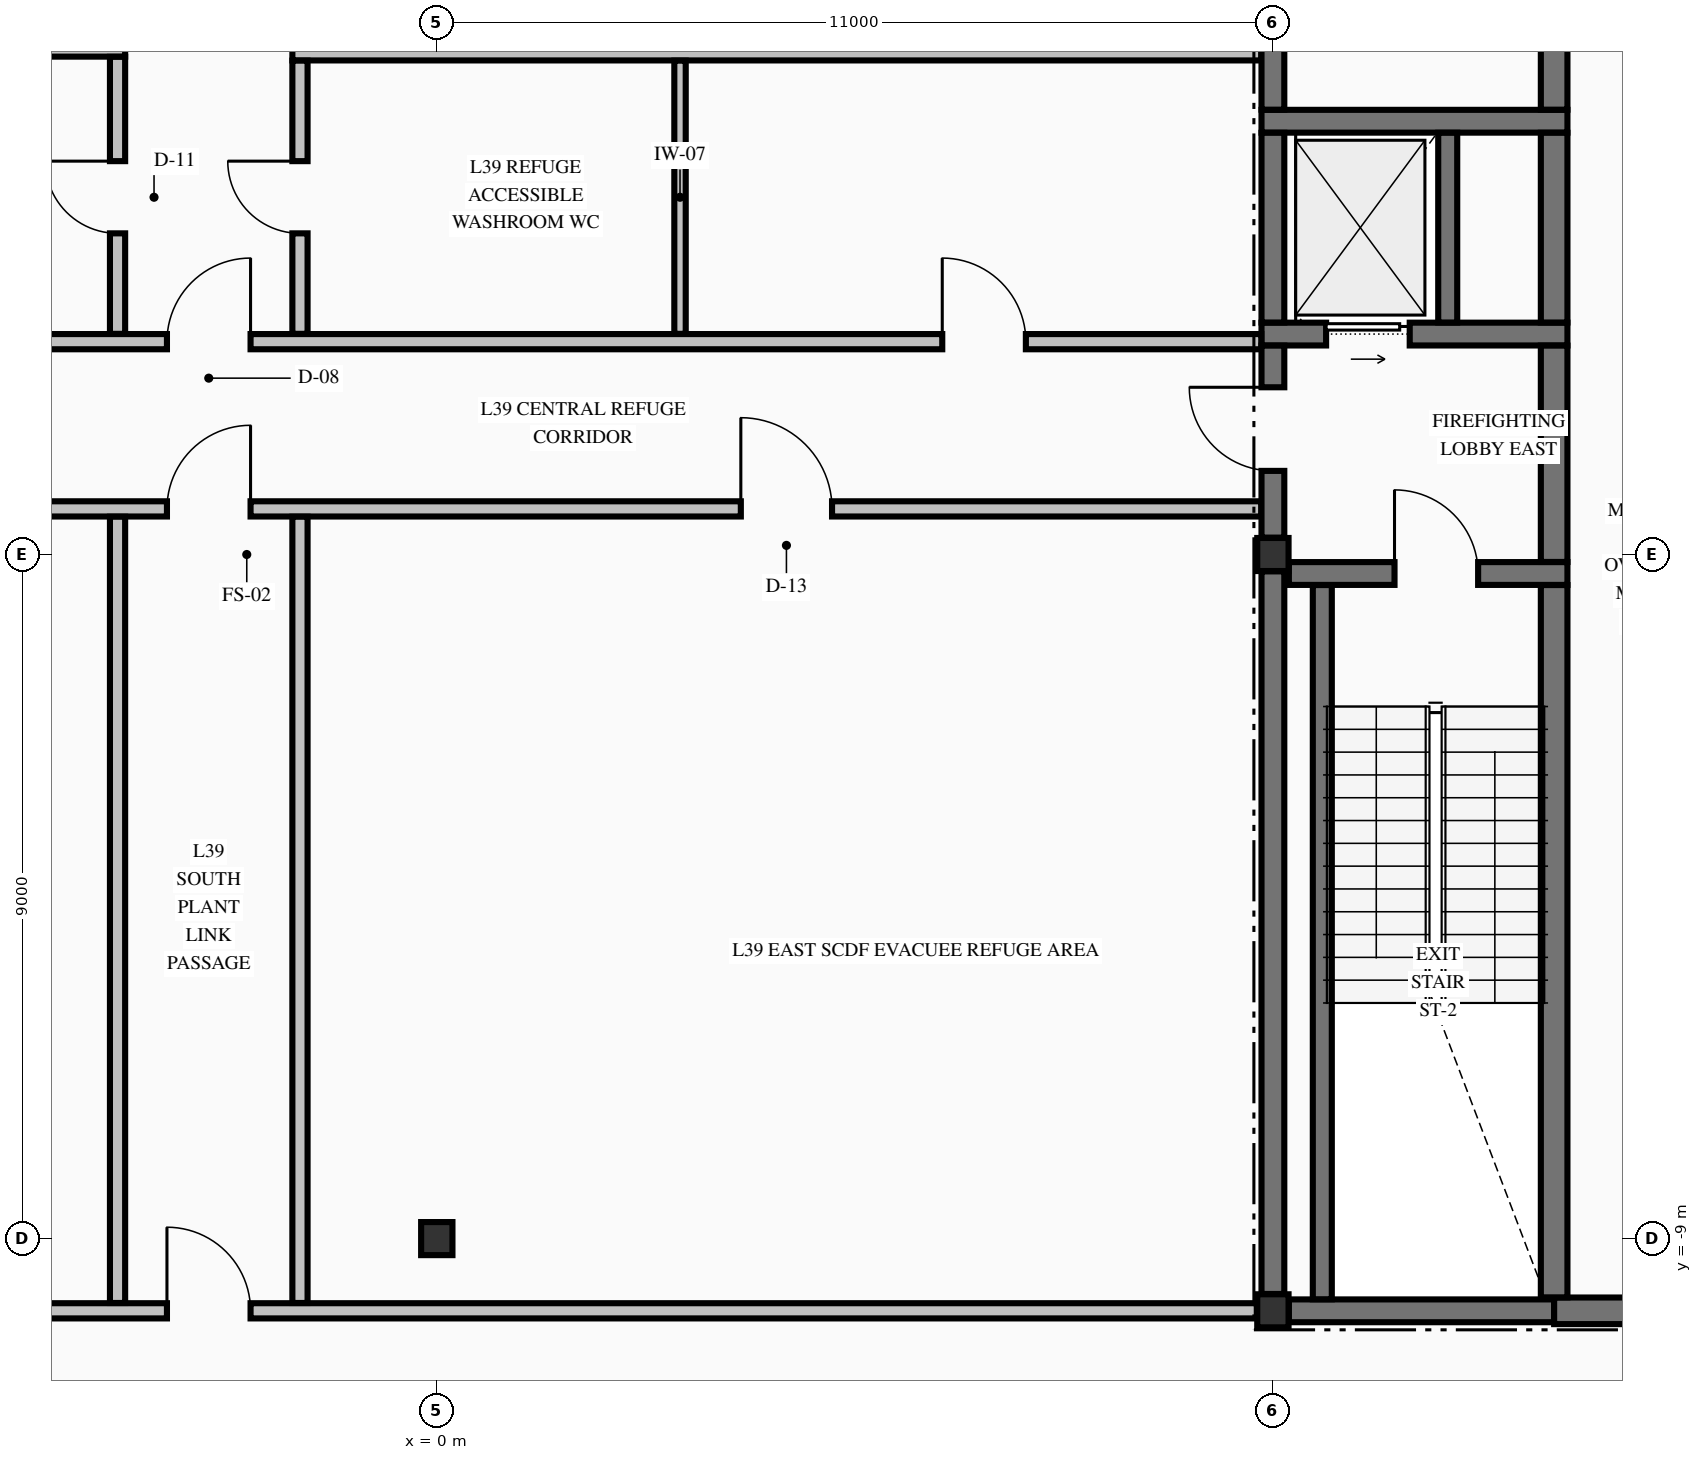
"""IFC4 building model, lengths in metres.
Left out: names, types, materials, properties, quantities, classifications, styles, units other than length and angle.
Written with IfcOpenShell. Run it as: python <this file> out.ifc"""

import sys

from ifc_helpers import new_model, si_unit, direction, frame, frame_2d, origin, origin_2d, place, context, subcontext, project, spatial, rectangle, i_section, extrude, element, fill, save


model = new_model("IFC4")
c1 = context("Model", 3, precision=1e-05, world=origin(), true_north=direction((0.0, 1.0)))
c2 = subcontext(c1, "Body", "Model", "MODEL_VIEW")
j1 = project(units=[si_unit("LENGTHUNIT", "METRE"), si_unit("PLANEANGLEUNIT", "RADIAN")], contexts=[c1])
p1 = place(None, origin())
s1 = spatial("IfcSite", under=j1, at=p1, CompositionType="ELEMENT")
p2 = place(p1, origin())
s2 = spatial("IfcBuilding", under=s1, at=p2, CompositionType="ELEMENT")
p3 = place(p2, frame((0.0, 0.0, 153.48)))
s3 = spatial("IfcBuildingStorey", under=s2, at=p3, CompositionType="ELEMENT", Elevation=153.48)
for number, where, z_axis, x_axis in (
    (1, (11.0, -9.95, -0.425), (0.0, 0.0, 1.0), (1.0, 0.0, 0.0)),
    (2, (11.0, 0.0, -0.425), (0.0, 0.0, 1.0), (1.0, 0.0, 0.0)),
    (3, (0.0, -9.0, -0.425), (0.0, 0.0, 1.0), (1.0, 0.0, 0.0)),
):
    element("IfcColumn", number, at=place(p3, frame(where, z_axis=z_axis, x_axis=x_axis)), inside=s3, PredefinedType="COLUMN", context=c2, shape_type="SweptSolid", body=[
        extrude(i_section(OverallWidth=0.412, OverallDepth=0.435, WebThickness=0.036, FlangeThickness=0.058, FilletRadius=0.015, at=origin_2d()), origin(), (0.0, 0.0, 1.0), 4.76),
    ])
p4 = place(p3, frame((11.21, -9.95, 0.0), z_axis=(0.0, 0.0, 1.0), x_axis=(1.0, 0.0, 0.0)))
e4 = element("IfcWall", 4, at=p4, inside=s3, PredefinedType="SHEAR", context=c2, shape_type="SweptSolid", body=[
    extrude(rectangle(XDim=3.49, YDim=0.3, at=frame_2d((1.745, 0.0))), origin(), (0.0, 0.0, 1.0), 4.335),
])
p5 = place(p3, frame((14.7, -9.95, 0.0), z_axis=(0.0, 0.0, 1.0), x_axis=(1.0, 0.0, 0.0)))
e5 = element("IfcWall", 5, at=p5, inside=s3, PredefinedType="SHEAR", context=c2, shape_type="SweptSolid", body=[
    extrude(rectangle(XDim=5.09, YDim=0.35, at=frame_2d((2.545, 0.0))), origin(), (0.0, 0.0, 1.0), 4.335),
])
p6 = place(p5, frame((3.25, 0.0, 0.0)))
e6 = element("IfcOpeningElement", 6, at=p6, cuts=e5, PredefinedType="OPENING", context=c2, shape_type="SweptSolid", body=[
    extrude(rectangle(XDim=0.9, YDim=2.15, at=frame_2d((0.45, 1.075))), frame((0.0, 0.185, 0.0), z_axis=(0.0, -1.0, 0.0), x_axis=(1.0, 0.0, 0.0)), (0.0, 0.0, 1.0), 0.37),
])
p7 = place(p3, frame((11.21, -0.25, 0.0), z_axis=(0.0, 0.0, 1.0), x_axis=(1.0, 0.0, 0.0)))
e7 = element("IfcWall", 7, at=p7, inside=s3, PredefinedType="SHEAR", context=c2, shape_type="SweptSolid", body=[
    extrude(rectangle(XDim=3.665, YDim=0.3, at=frame_2d((1.833, 0.0))), origin(), (0.0, 0.0, 1.0), 4.335),
])
p8 = place(p7, frame((1.39, 0.0, 0.0)))
e8 = element("IfcOpeningElement", 8, at=p8, cuts=e7, PredefinedType="OPENING", context=c2, shape_type="SweptSolid", body=[
    extrude(rectangle(XDim=1.1, YDim=2.15, at=frame_2d((0.55, 1.075))), frame((0.0, 0.16, 0.0), z_axis=(0.0, -1.0, 0.0), x_axis=(1.0, 0.0, 0.0)), (0.0, 0.0, 1.0), 0.32),
])
p9 = place(p3, frame((10.85, 2.9, 0.0), z_axis=(0.0, 0.0, 1.0), x_axis=(1.0, 0.0, 0.0)))
e9 = element("IfcWall", 9, at=p9, inside=s3, PredefinedType="SHEAR", context=c2, shape_type="SweptSolid", body=[
    extrude(rectangle(XDim=4.025, YDim=0.3, at=frame_2d((2.012, 0.0))), origin(), (0.0, 0.0, 1.0), 4.335),
])
p10 = place(p9, frame((0.85, 0.0, 0.0)))
e10 = element("IfcOpeningElement", 10, at=p10, cuts=e9, PredefinedType="OPENING", context=c2, shape_type="SweptSolid", body=[
    extrude(rectangle(XDim=1.1, YDim=2.2, at=frame_2d((0.55, 1.1))), frame((0.0, 0.16, 0.0), z_axis=(0.0, -1.0, 0.0), x_axis=(1.0, 0.0, 0.0)), (0.0, 0.0, 1.0), 0.32),
])
p11 = place(p3, frame((10.85, 5.7, 0.0), z_axis=(0.0, 0.0, 1.0), x_axis=(1.0, 0.0, 0.0)))
e11 = element("IfcWall", 11, at=p11, inside=s3, PredefinedType="SHEAR", context=c2, shape_type="SweptSolid", body=[
    extrude(rectangle(XDim=4.025, YDim=0.3, at=frame_2d((2.012, 0.0))), origin(), (0.0, 0.0, 1.0), 4.335),
])
p12 = place(p3, frame((-10.788, -9.95, 0.0), z_axis=(0.0, 0.0, 1.0), x_axis=(1.0, 0.0, 0.0)))
e12 = element("IfcWall", 12, at=p12, inside=s3, PredefinedType="PARTITIONING", context=c2, shape_type="SweptSolid", body=[
    extrude(rectangle(XDim=21.576, YDim=0.2, at=frame_2d((10.788, 0.0))), origin(), (0.0, 0.0, 1.0), 4.335),
])
p13 = place(p12, frame((7.238, 0.0, 0.0)))
e13 = element("IfcOpeningElement", 13, at=p13, cuts=e12, PredefinedType="OPENING", context=c2, shape_type="SweptSolid", body=[
    extrude(rectangle(XDim=1.1, YDim=2.15, at=frame_2d((0.55, 1.075))), frame((0.0, 0.11, 0.0), z_axis=(0.0, -1.0, 0.0), x_axis=(1.0, 0.0, 0.0)), (0.0, 0.0, 1.0), 0.22),
])
p14 = place(p3, frame((-10.847, 0.6, 0.0), z_axis=(0.0, 0.0, 1.0), x_axis=(1.0, 0.0, 0.0)))
e14 = element("IfcWall", 14, at=p14, inside=s3, PredefinedType="PARTITIONING", context=c2, shape_type="SweptSolid", body=[
    extrude(rectangle(XDim=21.694, YDim=0.2, at=frame_2d((10.847, 0.0))), origin(), (0.0, 0.0, 1.0), 4.335),
])
p15 = place(p14, frame((7.297, 0.0, 0.0)))
e15 = element("IfcOpeningElement", 15, at=p15, cuts=e14, PredefinedType="OPENING", context=c2, shape_type="SweptSolid", body=[
    extrude(rectangle(XDim=1.1, YDim=2.15, at=frame_2d((0.55, 1.075))), frame((0.0, 0.11, 0.0), z_axis=(0.0, -1.0, 0.0), x_axis=(1.0, 0.0, 0.0)), (0.0, 0.0, 1.0), 0.22),
])
p16 = place(p14, frame((2.647, 0.0, 0.0)))
e16 = element("IfcOpeningElement", 16, at=p16, cuts=e14, PredefinedType="OPENING", context=c2, shape_type="SweptSolid", body=[
    extrude(rectangle(XDim=1.2, YDim=2.15, at=frame_2d((0.6, 1.075))), frame((0.0, 0.11, 0.0), z_axis=(0.0, -1.0, 0.0), x_axis=(1.0, 0.0, 0.0)), (0.0, 0.0, 1.0), 0.22),
])
p17 = place(p14, frame((14.847, 0.0, 0.0)))
e17 = element("IfcOpeningElement", 17, at=p17, cuts=e14, PredefinedType="OPENING", context=c2, shape_type="SweptSolid", body=[
    extrude(rectangle(XDim=1.2, YDim=2.15, at=frame_2d((0.6, 1.075))), frame((0.0, 0.11, 0.0), z_axis=(0.0, -1.0, 0.0), x_axis=(1.0, 0.0, 0.0)), (0.0, 0.0, 1.0), 0.22),
])
p18 = place(p3, frame((-10.847, 2.8, 0.0), z_axis=(0.0, 0.0, 1.0), x_axis=(1.0, 0.0, 0.0)))
e18 = element("IfcWall", 18, at=p18, inside=s3, PredefinedType="PARTITIONING", context=c2, shape_type="SweptSolid", body=[
    extrude(rectangle(XDim=21.694, YDim=0.2, at=frame_2d((10.847, 0.0))), origin(), (0.0, 0.0, 1.0), 4.335),
])
p19 = place(p18, frame((7.297, 0.0, 0.0)))
e19 = element("IfcOpeningElement", 19, at=p19, cuts=e18, PredefinedType="OPENING", context=c2, shape_type="SweptSolid", body=[
    extrude(rectangle(XDim=1.1, YDim=2.15, at=frame_2d((0.55, 1.075))), frame((0.0, 0.11, 0.0), z_axis=(0.0, -1.0, 0.0), x_axis=(1.0, 0.0, 0.0)), (0.0, 0.0, 1.0), 0.22),
])
p20 = place(p18, frame((17.497, 0.0, 0.0)))
e20 = element("IfcOpeningElement", 20, at=p20, cuts=e18, PredefinedType="OPENING", context=c2, shape_type="SweptSolid", body=[
    extrude(rectangle(XDim=1.1, YDim=2.15, at=frame_2d((0.55, 1.075))), frame((0.0, 0.11, 0.0), z_axis=(0.0, -1.0, 0.0), x_axis=(1.0, 0.0, 0.0)), (0.0, 0.0, 1.0), 0.22),
])
p21 = place(p3, frame((-1.9, 6.6, 0.0), z_axis=(0.0, 0.0, 1.0), x_axis=(1.0, 0.0, 0.0)))
e21 = element("IfcWall", 21, at=p21, inside=s3, PredefinedType="PARTITIONING", context=c2, shape_type="SweptSolid", body=[
    extrude(rectangle(XDim=12.747, YDim=0.2, at=frame_2d((6.374, 0.0))), origin(), (0.0, 0.0, 1.0), 4.335),
])
p22 = place(p3, frame((-10.847, 6.65, 0.0), z_axis=(0.0, 0.0, 1.0), x_axis=(1.0, 0.0, 0.0)))
e22 = element("IfcWall", 22, at=p22, inside=s3, PredefinedType="PARTITIONING", context=c2, shape_type="SweptSolid", body=[
    extrude(rectangle(XDim=6.747, YDim=0.2, at=frame_2d((3.374, 0.0))), origin(), (0.0, 0.0, 1.0), 4.335),
])
p23 = place(p3, frame((11.0, -9.729, 0.0), z_axis=(0.0, 0.0, 1.0), x_axis=(0.0, 1.0, 0.0)))
e23 = element("IfcWall", 23, at=p23, inside=s3, PredefinedType="SHEAR", context=c2, shape_type="SweptSolid", body=[
    extrude(rectangle(XDim=9.507, YDim=0.3, at=frame_2d((4.753, 0.0))), origin(), (0.0, 0.0, 1.0), 4.335),
])
p24 = place(p3, frame((11.0, 0.221, 0.0), z_axis=(0.0, 0.0, 1.0), x_axis=(0.0, 1.0, 0.0)))
e24 = element("IfcWall", 24, at=p24, inside=s3, PredefinedType="SHEAR", context=c2, shape_type="SweptSolid", body=[
    extrude(rectangle(XDim=2.527, YDim=0.3, at=frame_2d((1.263, 0.0))), origin(), (0.0, 0.0, 1.0), 4.335),
])
p25 = place(p24, frame((0.878, 0.0, 0.0)))
e25 = element("IfcOpeningElement", 25, at=p25, cuts=e24, PredefinedType="OPENING", context=c2, shape_type="SweptSolid", body=[
    extrude(rectangle(XDim=1.1, YDim=2.15, at=frame_2d((0.55, 1.075))), frame((0.0, 0.16, 0.0), z_axis=(0.0, -1.0, 0.0), x_axis=(1.0, 0.0, 0.0)), (0.0, 0.0, 1.0), 0.32),
])
p26 = place(p3, frame((11.0, 3.052, 0.0), z_axis=(0.0, 0.0, 1.0), x_axis=(0.0, 1.0, 0.0)))
e26 = element("IfcWall", 26, at=p26, inside=s3, PredefinedType="SHEAR", context=c2, shape_type="SweptSolid", body=[
    extrude(rectangle(XDim=2.496, YDim=0.3, at=frame_2d((1.248, 0.0))), origin(), (0.0, 0.0, 1.0), 4.335),
])
p27 = place(p3, frame((11.0, 5.852, 0.0), z_axis=(0.0, 0.0, 1.0), x_axis=(0.0, 1.0, 0.0)))
e27 = element("IfcWall", 27, at=p27, inside=s3, PredefinedType="SHEAR", context=c2, shape_type="SweptSolid", body=[
    extrude(rectangle(XDim=4.427, YDim=0.3, at=frame_2d((2.213, 0.0))), origin(), (0.0, 0.0, 1.0), 4.335),
])
p28 = place(p3, frame((11.65, -9.798, 0.0), z_axis=(0.0, 0.0, 1.0), x_axis=(0.0, 1.0, 0.0)))
e28 = element("IfcWall", 28, at=p28, inside=s3, PredefinedType="SOLIDWALL", context=c2, shape_type="SweptSolid", body=[
    extrude(rectangle(XDim=9.396, YDim=0.25, at=frame_2d((4.698, 0.0))), origin(), (0.0, 0.0, 1.0), 4.335),
])
p29 = place(p3, frame((13.3, 3.052, 0.0), z_axis=(0.0, 0.0, 1.0), x_axis=(0.0, 1.0, 0.0)))
e29 = element("IfcWall", 29, at=p29, inside=s3, PredefinedType="SOLIDWALL", context=c2, shape_type="SweptSolid", body=[
    extrude(rectangle(XDim=2.496, YDim=0.25, at=frame_2d((1.248, 0.0))), origin(), (0.0, 0.0, 1.0), 4.335),
])
p30 = place(p3, frame((14.7, -9.773, 0.0), z_axis=(0.0, 0.0, 1.0), x_axis=(0.0, 1.0, 0.0)))
e30 = element("IfcWall", 30, at=p30, inside=s3, PredefinedType="SHEAR", context=c2, shape_type="SweptSolid", body=[
    extrude(rectangle(XDim=9.371, YDim=0.35, at=frame_2d((4.686, 0.0))), origin(), (0.0, 0.0, 1.0), 4.335),
])
p31 = place(p3, frame((14.7, -0.098, 0.0), z_axis=(0.0, 0.0, 1.0), x_axis=(0.0, 1.0, 0.0)))
e31 = element("IfcWall", 31, at=p31, inside=s3, PredefinedType="SHEAR", context=c2, shape_type="SweptSolid", body=[
    extrude(rectangle(XDim=2.846, YDim=0.35, at=frame_2d((1.423, 0.0))), origin(), (0.0, 0.0, 1.0), 4.335),
])
p32 = place(p3, frame((14.7, 3.052, 0.0), z_axis=(0.0, 0.0, 1.0), x_axis=(0.0, 1.0, 0.0)))
e32 = element("IfcWall", 32, at=p32, inside=s3, PredefinedType="SHEAR", context=c2, shape_type="SweptSolid", body=[
    extrude(rectangle(XDim=2.496, YDim=0.35, at=frame_2d((1.248, 0.0))), origin(), (0.0, 0.0, 1.0), 4.335),
])
p33 = place(p3, frame((14.7, 5.852, 0.0), z_axis=(0.0, 0.0, 1.0), x_axis=(0.0, 1.0, 0.0)))
e33 = element("IfcWall", 33, at=p33, inside=s3, PredefinedType="SHEAR", context=c2, shape_type="SweptSolid", body=[
    extrude(rectangle(XDim=4.471, YDim=0.35, at=frame_2d((2.235, 0.0))), origin(), (0.0, 0.0, 1.0), 4.335),
])
p34 = place(p3, frame((-4.2, -9.847, 0.0), z_axis=(0.0, 0.0, 1.0), x_axis=(0.0, 1.0, 0.0)))
e34 = element("IfcWall", 34, at=p34, inside=s3, PredefinedType="PARTITIONING", context=c2, shape_type="SweptSolid", body=[
    extrude(rectangle(XDim=10.344, YDim=0.2, at=frame_2d((5.172, 0.0))), origin(), (0.0, 0.0, 1.0), 4.335),
])
p35 = place(p3, frame((-4.2, 2.903, 0.0), z_axis=(0.0, 0.0, 1.0), x_axis=(0.0, 1.0, 0.0)))
e35 = element("IfcWall", 35, at=p35, inside=s3, PredefinedType="PARTITIONING", context=c2, shape_type="SweptSolid", body=[
    extrude(rectangle(XDim=3.644, YDim=0.2, at=frame_2d((1.822, 0.0))), origin(), (0.0, 0.0, 1.0), 4.335),
])
p36 = place(p35, frame((1.322, 0.0, 0.0)))
e36 = element("IfcOpeningElement", 36, at=p36, cuts=e35, PredefinedType="OPENING", context=c2, shape_type="SweptSolid", body=[
    extrude(rectangle(XDim=0.95, YDim=2.15, at=frame_2d((0.475, 1.075))), frame((0.0, 0.11, 0.0), z_axis=(0.0, -1.0, 0.0), x_axis=(1.0, 0.0, 0.0)), (0.0, 0.0, 1.0), 0.22),
])
p37 = place(p3, frame((-1.8, -9.847, 0.0), z_axis=(0.0, 0.0, 1.0), x_axis=(0.0, 1.0, 0.0)))
e37 = element("IfcWall", 37, at=p37, inside=s3, PredefinedType="PARTITIONING", context=c2, shape_type="SweptSolid", body=[
    extrude(rectangle(XDim=10.344, YDim=0.2, at=frame_2d((5.172, 0.0))), origin(), (0.0, 0.0, 1.0), 4.335),
])
p38 = place(p3, frame((-1.8, 2.903, 0.0), z_axis=(0.0, 0.0, 1.0), x_axis=(0.0, 1.0, 0.0)))
e38 = element("IfcWall", 38, at=p38, inside=s3, PredefinedType="PARTITIONING", context=c2, shape_type="SweptSolid", body=[
    extrude(rectangle(XDim=3.594, YDim=0.2, at=frame_2d((1.797, 0.0))), origin(), (0.0, 0.0, 1.0), 4.335),
])
p39 = place(p38, frame((1.322, 0.0, 0.0)))
e39 = element("IfcOpeningElement", 39, at=p39, cuts=e38, PredefinedType="OPENING", context=c2, shape_type="SweptSolid", body=[
    extrude(rectangle(XDim=0.95, YDim=2.15, at=frame_2d((0.475, 1.075))), frame((0.0, 0.11, 0.0), z_axis=(0.0, -1.0, 0.0), x_axis=(1.0, 0.0, 0.0)), (0.0, 0.0, 1.0), 0.22),
])
p40 = place(p3, frame((3.2, 2.903, 0.0), z_axis=(0.0, 0.0, 1.0), x_axis=(0.0, 1.0, 0.0)))
e40 = element("IfcWall", 40, at=p40, inside=s3, PredefinedType="PARTITIONING", context=c2, shape_type="SweptSolid", body=[
    extrude(rectangle(XDim=3.594, YDim=0.15, at=frame_2d((1.797, 0.0))), origin(), (0.0, 0.0, 1.0), 4.335),
])
p41 = place(p8, origin())
e41 = element("IfcDoor", 41, at=p41, inside=s3, OperationType="SINGLE_SWING_LEFT", PredefinedType="DOOR", context=c2, shape_type="SweptSolid", body=[
    extrude(rectangle(XDim=1.1, YDim=2.15, at=frame_2d((0.55, 1.075))), frame((0.0, 0.025, 0.0), z_axis=(0.0, -1.0, 0.0), x_axis=(1.0, 0.0, 0.0)), (0.0, 0.0, 1.0), 0.05),
])
fill(e8, e41)
p42 = place(p25, origin())
e42 = element("IfcDoor", 42, at=p42, inside=s3, OperationType="SINGLE_SWING_RIGHT", PredefinedType="DOOR", context=c2, shape_type="SweptSolid", body=[
    extrude(rectangle(XDim=1.1, YDim=2.15, at=frame_2d((0.55, 1.075))), frame((0.0, 0.025, 0.0), z_axis=(0.0, -1.0, 0.0), x_axis=(1.0, 0.0, 0.0)), (0.0, 0.0, 1.0), 0.05),
])
fill(e25, e42)
p43 = place(p10, origin())
e43 = element("IfcDoor", 43, at=p43, inside=s3, OperationType="SLIDING_TO_RIGHT", PredefinedType="DOOR", context=c2, shape_type="SweptSolid", body=[
    extrude(rectangle(XDim=1.1, YDim=2.2, at=frame_2d((0.55, 1.1))), frame((0.0, 0.025, 0.0), z_axis=(0.0, -1.0, 0.0), x_axis=(1.0, 0.0, 0.0)), (0.0, 0.0, 1.0), 0.05),
])
fill(e10, e43)
p44 = place(p19, origin())
e44 = element("IfcDoor", 44, at=p44, inside=s3, OperationType="SINGLE_SWING_RIGHT", PredefinedType="DOOR", context=c2, shape_type="SweptSolid", body=[
    extrude(rectangle(XDim=1.1, YDim=2.15, at=frame_2d((0.55, 1.075))), frame((0.0, 0.025, 0.0), z_axis=(0.0, -1.0, 0.0), x_axis=(1.0, 0.0, 0.0)), (0.0, 0.0, 1.0), 0.05),
])
fill(e19, e44)
p45 = place(p15, origin())
e45 = element("IfcDoor", 45, at=p45, inside=s3, OperationType="SINGLE_SWING_RIGHT", PredefinedType="DOOR", context=c2, shape_type="SweptSolid", body=[
    extrude(rectangle(XDim=1.1, YDim=2.15, at=frame_2d((0.55, 1.075))), frame((0.0, 0.025, 0.0), z_axis=(0.0, -1.0, 0.0), x_axis=(1.0, 0.0, 0.0)), (0.0, 0.0, 1.0), 0.05),
])
fill(e15, e45)
p46 = place(p13, origin())
e46 = element("IfcDoor", 46, at=p46, inside=s3, OperationType="SINGLE_SWING_LEFT", PredefinedType="DOOR", context=c2, shape_type="SweptSolid", body=[
    extrude(rectangle(XDim=1.1, YDim=2.15, at=frame_2d((0.55, 1.075))), frame((0.0, 0.025, 0.0), z_axis=(0.0, -1.0, 0.0), x_axis=(1.0, 0.0, 0.0)), (0.0, 0.0, 1.0), 0.05),
])
fill(e13, e46)
p47 = place(p17, origin())
e47 = element("IfcDoor", 47, at=p47, inside=s3, OperationType="SINGLE_SWING_LEFT", PredefinedType="DOOR", context=c2, shape_type="SweptSolid", body=[
    extrude(rectangle(XDim=1.2, YDim=2.15, at=frame_2d((0.6, 1.075))), frame((0.0, 0.025, 0.0), z_axis=(0.0, -1.0, 0.0), x_axis=(1.0, 0.0, 0.0)), (0.0, 0.0, 1.0), 0.05),
])
fill(e17, e47)
p48 = place(p36, origin())
e48 = element("IfcDoor", 48, at=p48, inside=s3, OperationType="SINGLE_SWING_RIGHT", PredefinedType="DOOR", context=c2, shape_type="SweptSolid", body=[
    extrude(rectangle(XDim=0.95, YDim=2.15, at=frame_2d((0.475, 1.075))), frame((0.0, 0.025, 0.0), z_axis=(0.0, -1.0, 0.0), x_axis=(1.0, 0.0, 0.0)), (0.0, 0.0, 1.0), 0.05),
])
fill(e36, e48)
p49 = place(p39, origin())
e49 = element("IfcDoor", 49, at=p49, inside=s3, OperationType="SINGLE_SWING_RIGHT", PredefinedType="DOOR", context=c2, shape_type="SweptSolid", body=[
    extrude(rectangle(XDim=0.95, YDim=2.15, at=frame_2d((0.475, 1.075))), frame((0.0, 0.025, 0.0), z_axis=(0.0, -1.0, 0.0), x_axis=(1.0, 0.0, 0.0)), (0.0, 0.0, 1.0), 0.05),
])
fill(e39, e49)
p50 = place(p20, origin())
e50 = element("IfcDoor", 50, at=p50, inside=s3, OperationType="SINGLE_SWING_LEFT", PredefinedType="DOOR", context=c2, shape_type="SweptSolid", body=[
    extrude(rectangle(XDim=1.1, YDim=2.15, at=frame_2d((0.55, 1.075))), frame((0.0, 0.025, 0.0), z_axis=(0.0, -1.0, 0.0), x_axis=(1.0, 0.0, 0.0)), (0.0, 0.0, 1.0), 0.05),
])
fill(e20, e50)
save(model, sys.argv[1])
